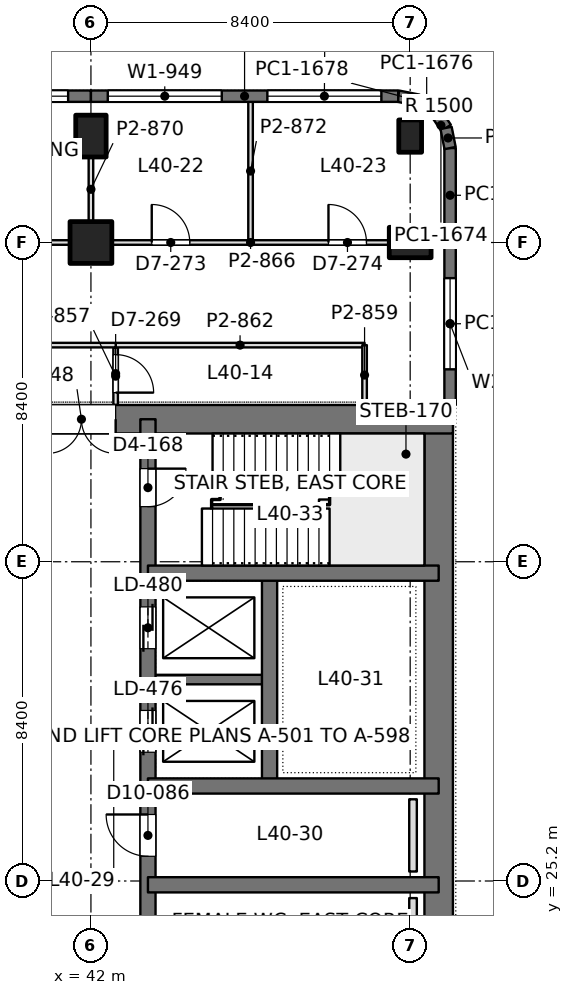
"""IFC4 building model, lengths in metres.
Left out: names, types, materials, properties, quantities, classifications, styles, units other than length and angle.
Written with IfcOpenShell. Run it as: python <this file> out.ifc"""

import sys

from ifc_helpers import new_model, si_unit, direction, frame, frame_2d, origin, origin_2d, place, context, subcontext, project, spatial, rectangle, extrude, element, fill, save


model = new_model("IFC4")
c1 = context("Model", 3, precision=1e-05, world=origin(), true_north=direction((0.0, 1.0)))
c2 = subcontext(c1, "Body", "Model", "MODEL_VIEW")
j1 = project(units=[si_unit("LENGTHUNIT", "METRE"), si_unit("PLANEANGLEUNIT", "RADIAN")], contexts=[c1])
p1 = place(None, origin())
s1 = spatial("IfcSite", under=j1, at=p1, CompositionType="ELEMENT")
p2 = place(p1, origin())
s2 = spatial("IfcBuilding", under=s1, at=p2, CompositionType="ELEMENT")
p3 = place(p2, frame((0.0, 0.0, 177.6)))
s3 = spatial("IfcBuildingStorey", under=s2, at=p3, CompositionType="ELEMENT", Elevation=177.6)
p4 = place(p3, frame((42.0, 42.0, 0.0), z_axis=(0.0, 0.0, 1.0), x_axis=(1.0, 0.0, 0.0)))
e1 = element("IfcColumn", 1, at=p4, inside=s3, PredefinedType="COLUMN", context=c2, shape_type="SweptSolid", body=[
    extrude(rectangle(XDim=1.1, YDim=1.1, at=origin_2d()), origin(), (0.0, 0.0, 1.0), 4.2),
])
for number, where, z_axis, x_axis in (
    (2, (42.0, 44.8, 0.0), (0.0, 0.0, 1.0), (1.0, 0.0, 0.0)),
    (3, (50.4, 42.0, 0.0), (0.0, 0.0, 1.0), (0.0, 1.0, 0.0)),
):
    element("IfcColumn", number, at=place(p3, frame(where, z_axis=z_axis, x_axis=x_axis)), inside=s3, PredefinedType="COLUMN", context=c2, shape_type="SweptSolid", body=[
        extrude(rectangle(XDim=0.8, YDim=1.1, at=origin_2d()), origin(), (0.0, 0.0, 1.0), 4.2),
    ])
p5 = place(p3, frame((50.4, 44.8, 0.0), z_axis=(0.0, 0.0, 1.0), x_axis=(1.0, 0.0, 0.0)))
e4 = element("IfcColumn", 4, at=p5, inside=s3, PredefinedType="COLUMN", context=c2, shape_type="SweptSolid", body=[
    extrude(rectangle(XDim=0.6, YDim=0.85, at=origin_2d()), origin(), (0.0, 0.0, 1.0), 4.2),
])
p6 = place(p3, frame((33.675, 37.35, 0.0), z_axis=(0.0, 0.0, 1.0), x_axis=(1.0, 0.0, 0.0)))
e5 = element("IfcWall", 5, at=p6, inside=s3, PredefinedType="SHEAR", context=c2, shape_type="SweptSolid", body=[
    extrude(rectangle(XDim=17.85, YDim=0.75, at=frame_2d((8.925, 0.0))), origin(), (0.0, 0.0, 1.0), 4.2),
])
p7 = place(p6, frame((7.175, 0.0, 0.0)))
e6 = element("IfcOpeningElement", 6, at=p7, cuts=e5, PredefinedType="OPENING", context=c2, shape_type="SweptSolid", body=[
    extrude(rectangle(XDim=1.8, YDim=2.4, at=frame_2d((0.9, 1.2))), frame((0.0, 0.385, 0.0), z_axis=(0.0, -1.0, 0.0), x_axis=(1.0, 0.0, 0.0)), (0.0, 0.0, 1.0), 0.77),
])
p8 = place(p3, frame((51.15, 13.05, 0.0), z_axis=(0.0, 0.0, 1.0), x_axis=(0.0, 1.0, 0.0)))
e7 = element("IfcWall", 7, at=p8, inside=s3, PredefinedType="SHEAR", context=c2, shape_type="SweptSolid", body=[
    extrude(rectangle(XDim=24.3, YDim=0.75, at=frame_2d((12.15, 0.0))), origin(), (0.0, 0.0, 1.0), 4.2),
])
p9 = place(p3, frame((43.5, 13.05, 0.0), z_axis=(0.0, 0.0, 1.0), x_axis=(0.0, 1.0, 0.0)))
e8 = element("IfcWall", 8, at=p9, inside=s3, PredefinedType="SHEAR", context=c2, shape_type="SweptSolid", body=[
    extrude(rectangle(XDim=24.3, YDim=0.4, at=frame_2d((12.15, 0.0))), origin(), (0.0, 0.0, 1.0), 4.2),
])
p10 = place(p9, frame((1.3, 0.0, 0.0)))
e9 = element("IfcOpeningElement", 9, at=p10, cuts=e8, PredefinedType="OPENING", context=c2, shape_type="SweptSolid", body=[
    extrude(rectangle(XDim=1.0, YDim=2.2, at=frame_2d((0.5, 1.1))), frame((0.0, 0.21, 0.0), z_axis=(0.0, -1.0, 0.0), x_axis=(1.0, 0.0, 0.0)), (0.0, 0.0, 1.0), 0.42),
])
p11 = place(p9, frame((22.0, 0.0, 0.0)))
e10 = element("IfcOpeningElement", 10, at=p11, cuts=e8, PredefinedType="OPENING", context=c2, shape_type="SweptSolid", body=[
    extrude(rectangle(XDim=1.0, YDim=2.2, at=frame_2d((0.5, 1.1))), frame((0.0, 0.21, 0.0), z_axis=(0.0, -1.0, 0.0), x_axis=(1.0, 0.0, 0.0)), (0.0, 0.0, 1.0), 0.42),
])
p12 = place(p9, frame((5.55, 0.0, 0.0)))
e11 = element("IfcOpeningElement", 11, at=p12, cuts=e8, PredefinedType="OPENING", context=c2, shape_type="SweptSolid", body=[
    extrude(rectangle(XDim=1.0, YDim=2.2, at=frame_2d((0.5, 1.1))), frame((0.0, 0.21, 0.0), z_axis=(0.0, -1.0, 0.0), x_axis=(1.0, 0.0, 0.0)), (0.0, 0.0, 1.0), 0.42),
])
p13 = place(p9, frame((9.55, 0.0, 0.0)))
e12 = element("IfcOpeningElement", 12, at=p13, cuts=e8, PredefinedType="OPENING", context=c2, shape_type="SweptSolid", body=[
    extrude(rectangle(XDim=1.0, YDim=2.2, at=frame_2d((0.5, 1.1))), frame((0.0, 0.21, 0.0), z_axis=(0.0, -1.0, 0.0), x_axis=(1.0, 0.0, 0.0)), (0.0, 0.0, 1.0), 0.42),
])
p14 = place(p9, frame((12.8, 0.0, 0.0)))
e13 = element("IfcOpeningElement", 13, at=p14, cuts=e8, PredefinedType="OPENING", context=c2, shape_type="SweptSolid", body=[
    extrude(rectangle(XDim=1.1, YDim=2.2, at=frame_2d((0.55, 1.1))), frame((0.0, 0.21, 0.0), z_axis=(0.0, -1.0, 0.0), x_axis=(1.0, 0.0, 0.0)), (0.0, 0.0, 1.0), 0.42),
])
p15 = place(p9, frame((15.538, 0.0, 0.0)))
e14 = element("IfcOpeningElement", 14, at=p15, cuts=e8, PredefinedType="OPENING", context=c2, shape_type="SweptSolid", body=[
    extrude(rectangle(XDim=1.1, YDim=2.2, at=frame_2d((0.55, 1.1))), frame((0.0, 0.21, 0.0), z_axis=(0.0, -1.0, 0.0), x_axis=(1.0, 0.0, 0.0)), (0.0, 0.0, 1.0), 0.42),
])
p16 = place(p9, frame((18.262, 0.0, 0.0)))
e15 = element("IfcOpeningElement", 15, at=p16, cuts=e8, PredefinedType="OPENING", context=c2, shape_type="SweptSolid", body=[
    extrude(rectangle(XDim=1.1, YDim=2.2, at=frame_2d((0.55, 1.1))), frame((0.0, 0.21, 0.0), z_axis=(0.0, -1.0, 0.0), x_axis=(1.0, 0.0, 0.0)), (0.0, 0.0, 1.0), 0.42),
])
for number, where, z_axis, x_axis in (
    (16, (51.15, 25.1, 0.0), (0.0, 0.0, 1.0), (-1.0, 0.0, 0.0)),
    (17, (51.15, 27.7, 0.0), (0.0, 0.0, 1.0), (-1.0, 0.0, 0.0)),
    (18, (51.15, 33.3, 0.0), (0.0, 0.0, 1.0), (-1.0, 0.0, 0.0)),
):
    element("IfcWall", number, at=place(p3, frame(where, z_axis=z_axis, x_axis=x_axis)), inside=s3, PredefinedType="SHEAR", context=c2, shape_type="SweptSolid", body=[
        extrude(rectangle(XDim=7.65, YDim=0.4, at=frame_2d((3.825, 0.0))), origin(), (0.0, 0.0, 1.0), 4.2),
    ])
p17 = place(p3, frame((46.7, 27.7, 0.0), z_axis=(0.0, 0.0, 1.0), x_axis=(0.0, 1.0, 0.0)))
e19 = element("IfcWall", 19, at=p17, inside=s3, PredefinedType="SHEAR", context=c2, shape_type="SweptSolid", body=[
    extrude(rectangle(XDim=5.6, YDim=0.4, at=frame_2d((2.8, 0.0))), origin(), (0.0, 0.0, 1.0), 4.2),
])
p18 = place(p3, frame((46.7, 30.5, 0.0), z_axis=(0.0, 0.0, 1.0), x_axis=(-1.0, 0.0, 0.0)))
e20 = element("IfcWall", 20, at=p18, inside=s3, PredefinedType="SHEAR", context=c2, shape_type="SweptSolid", body=[
    extrude(rectangle(XDim=3.2, YDim=0.25, at=frame_2d((1.6, 0.0))), origin(), (0.0, 0.0, 1.0), 4.2),
])
p19 = place(p3, frame((33.6, 45.85, 0.0), z_axis=(0.0, 0.0, 1.0), x_axis=(1.0, 0.0, 0.0)))
e21 = element("IfcWall", 21, at=p19, inside=s3, PredefinedType="SOLIDWALL", context=c2, shape_type="SweptSolid", body=[
    extrude(rectangle(XDim=8.4, YDim=0.3, at=frame_2d((4.2, 0.0))), origin(), (0.0, 0.0, 1.0), 4.05),
])
p20 = place(p19, frame((0.6, 0.0, 0.9)))
e22 = element("IfcOpeningElement", 22, at=p20, cuts=e21, PredefinedType="OPENING", context=c2, shape_type="SweptSolid", body=[
    extrude(rectangle(XDim=3.0, YDim=1.9, at=frame_2d((1.5, 0.95))), frame((0.0, 0.16, 0.0), z_axis=(0.0, -1.0, 0.0), x_axis=(1.0, 0.0, 0.0)), (0.0, 0.0, 1.0), 0.32),
])
p21 = place(p19, frame((4.8, 0.0, 0.9)))
e23 = element("IfcOpeningElement", 23, at=p21, cuts=e21, PredefinedType="OPENING", context=c2, shape_type="SweptSolid", body=[
    extrude(rectangle(XDim=3.0, YDim=1.9, at=frame_2d((1.5, 0.95))), frame((0.0, 0.16, 0.0), z_axis=(0.0, -1.0, 0.0), x_axis=(1.0, 0.0, 0.0)), (0.0, 0.0, 1.0), 0.32),
])
p22 = place(p3, frame((42.0, 45.85, 0.0), z_axis=(0.0, 0.0, 1.0), x_axis=(1.0, 0.0, 0.0)))
e24 = element("IfcWall", 24, at=p22, inside=s3, PredefinedType="SOLIDWALL", context=c2, shape_type="SweptSolid", body=[
    extrude(rectangle(XDim=8.085, YDim=0.3, at=frame_2d((4.042, 0.0))), origin(), (0.0, 0.0, 1.0), 4.05),
])
p23 = place(p22, frame((0.443, 0.0, 0.9)))
e25 = element("IfcOpeningElement", 25, at=p23, cuts=e24, PredefinedType="OPENING", context=c2, shape_type="SweptSolid", body=[
    extrude(rectangle(XDim=3.0, YDim=1.9, at=frame_2d((1.5, 0.95))), frame((0.0, 0.16, 0.0), z_axis=(0.0, -1.0, 0.0), x_axis=(1.0, 0.0, 0.0)), (0.0, 0.0, 1.0), 0.32),
])
p24 = place(p22, frame((4.643, 0.0, 0.9)))
e26 = element("IfcOpeningElement", 26, at=p24, cuts=e24, PredefinedType="OPENING", context=c2, shape_type="SweptSolid", body=[
    extrude(rectangle(XDim=3.0, YDim=1.9, at=frame_2d((1.5, 0.95))), frame((0.0, 0.16, 0.0), z_axis=(0.0, -1.0, 0.0), x_axis=(1.0, 0.0, 0.0)), (0.0, 0.0, 1.0), 0.32),
])
p25 = place(p3, frame((50.085, 45.85, 0.0), z_axis=(0.0, 0.0, 1.0), x_axis=(0.980702050465, -0.1955082817, 0.0)))
e27 = element("IfcWall", 27, at=p25, inside=s3, PredefinedType="SOLIDWALL", context=c2, shape_type="SweptSolid", body=[
    extrude(rectangle(XDim=0.541, YDim=0.3, at=frame_2d((0.271, 0.0))), origin(), (0.0, 0.0, 1.0), 4.05),
])
p26 = place(p3, frame((50.615, 45.744, 0.0), z_axis=(0.0, 0.0, 1.0), x_axis=(0.831692711774, -0.555236195849, 0.0)))
e28 = element("IfcWall", 28, at=p26, inside=s3, PredefinedType="SOLIDWALL", context=c2, shape_type="SweptSolid", body=[
    extrude(rectangle(XDim=0.525, YDim=0.3, at=frame_2d((0.263, 0.0))), origin(), (0.0, 0.0, 1.0), 4.05),
])
p27 = place(p3, frame((51.052, 45.453, 0.0), z_axis=(0.0, 0.0, 1.0), x_axis=(0.55534295404, -0.831621430339, 0.0)))
e29 = element("IfcWall", 29, at=p27, inside=s3, PredefinedType="SOLIDWALL", context=c2, shape_type="SweptSolid", body=[
    extrude(rectangle(XDim=0.526, YDim=0.3, at=frame_2d((0.263, 0.0))), origin(), (0.0, 0.0, 1.0), 4.05),
])
p28 = place(p3, frame((51.344, 45.015, 0.0), z_axis=(0.0, 0.0, 1.0), x_axis=(0.195073962632, -0.980788534345, 0.0)))
e30 = element("IfcWall", 30, at=p28, inside=s3, PredefinedType="SOLIDWALL", context=c2, shape_type="SweptSolid", body=[
    extrude(rectangle(XDim=0.541, YDim=0.3, at=frame_2d((0.271, 0.0))), origin(), (0.0, 0.0, 1.0), 4.05),
])
p29 = place(p3, frame((51.45, 44.485, 0.0), z_axis=(0.0, 0.0, 1.0), x_axis=(0.0, -1.0, 0.0)))
e31 = element("IfcWall", 31, at=p29, inside=s3, PredefinedType="SOLIDWALL", context=c2, shape_type="SweptSolid", body=[
    extrude(rectangle(XDim=2.485, YDim=0.3, at=frame_2d((1.243, 0.0))), origin(), (0.0, 0.0, 1.0), 4.05),
])
p30 = place(p3, frame((51.45, 42.0, 0.0), z_axis=(0.0, 0.0, 1.0), x_axis=(0.0, -1.0, 0.0)))
e32 = element("IfcWall", 32, at=p30, inside=s3, PredefinedType="SOLIDWALL", context=c2, shape_type="SweptSolid", body=[
    extrude(rectangle(XDim=4.275, YDim=0.3, at=frame_2d((2.137, 0.0))), origin(), (0.0, 0.0, 1.0), 4.05),
])
p31 = place(p30, frame((0.938, 0.0, 0.9)))
e33 = element("IfcOpeningElement", 33, at=p31, cuts=e32, PredefinedType="OPENING", context=c2, shape_type="SweptSolid", body=[
    extrude(rectangle(XDim=2.4, YDim=1.9, at=frame_2d((1.2, 0.95))), frame((0.0, 0.16, 0.0), z_axis=(0.0, -1.0, 0.0), x_axis=(1.0, 0.0, 0.0)), (0.0, 0.0, 1.0), 0.32),
])
p32 = place(p3, frame((34.149, 42.0, 0.0), z_axis=(0.0, 0.0, 1.0), x_axis=(1.0, 0.0, 0.0)))
e34 = element("IfcWall", 34, at=p32, inside=s3, PredefinedType="PARTITIONING", context=c2, shape_type="SweptSolid", body=[
    extrude(rectangle(XDim=7.302, YDim=0.12, at=frame_2d((3.651, 0.0))), origin(), (0.0, 0.0, 1.0), 3.55),
])
p33 = place(p32, frame((2.751, 0.0, 0.0)))
e35 = element("IfcOpeningElement", 35, at=p33, cuts=e34, PredefinedType="OPENING", context=c2, shape_type="SweptSolid", body=[
    extrude(rectangle(XDim=1.8, YDim=2.2, at=frame_2d((0.9, 1.1))), frame((0.0, 0.07, 0.0), z_axis=(0.0, -1.0, 0.0), x_axis=(1.0, 0.0, 0.0)), (0.0, 0.0, 1.0), 0.14),
])
p34 = place(p3, frame((42.549, 42.0, 0.0), z_axis=(0.0, 0.0, 1.0), x_axis=(1.0, 0.0, 0.0)))
e36 = element("IfcWall", 36, at=p34, inside=s3, PredefinedType="PARTITIONING", context=c2, shape_type="SweptSolid", body=[
    extrude(rectangle(XDim=7.302, YDim=0.12, at=frame_2d((3.651, 0.0))), origin(), (0.0, 0.0, 1.0), 3.55),
])
p35 = place(p34, frame((1.051, 0.0, 0.0)))
e37 = element("IfcOpeningElement", 37, at=p35, cuts=e36, PredefinedType="OPENING", context=c2, shape_type="SweptSolid", body=[
    extrude(rectangle(XDim=1.0, YDim=2.4, at=frame_2d((0.5, 1.2))), frame((0.0, 0.07, 0.0), z_axis=(0.0, -1.0, 0.0), x_axis=(1.0, 0.0, 0.0)), (0.0, 0.0, 1.0), 0.14),
])
p36 = place(p34, frame((5.701, 0.0, 0.0)))
e38 = element("IfcOpeningElement", 38, at=p36, cuts=e36, PredefinedType="OPENING", context=c2, shape_type="SweptSolid", body=[
    extrude(rectangle(XDim=1.0, YDim=2.4, at=frame_2d((0.5, 1.2))), frame((0.0, 0.07, 0.0), z_axis=(0.0, -1.0, 0.0), x_axis=(1.0, 0.0, 0.0)), (0.0, 0.0, 1.0), 0.14),
])
p37 = place(p3, frame((42.0, 42.549, 0.0), z_axis=(0.0, 0.0, 1.0), x_axis=(0.0, 1.0, 0.0)))
e39 = element("IfcWall", 39, at=p37, inside=s3, PredefinedType="PARTITIONING", context=c2, shape_type="SweptSolid", body=[
    extrude(rectangle(XDim=1.702, YDim=0.12, at=frame_2d((0.851, 0.0))), origin(), (0.0, 0.0, 1.0), 3.69),
])
p38 = place(p3, frame((46.2, 42.058, 0.0), z_axis=(0.0, 0.0, 1.0), x_axis=(0.0, 1.0, 0.0)))
e40 = element("IfcWall", 40, at=p38, inside=s3, PredefinedType="PARTITIONING", context=c2, shape_type="SweptSolid", body=[
    extrude(rectangle(XDim=3.644, YDim=0.12, at=frame_2d((1.822, 0.0))), origin(), (0.0, 0.0, 1.0), 3.55),
])
p39 = place(p3, frame((7.748, 39.3, 0.0), z_axis=(0.0, 0.0, 1.0), x_axis=(1.0, 0.0, 0.0)))
e41 = element("IfcWall", 41, at=p39, inside=s3, PredefinedType="PARTITIONING", context=c2, shape_type="SweptSolid", body=[
    extrude(rectangle(XDim=34.904, YDim=0.12, at=frame_2d((17.452, 0.0))), origin(), (0.0, 0.0, 1.0), 3.55),
])
p40 = place(p39, frame((10.735, 0.0, 0.0)))
e42 = element("IfcOpeningElement", 42, at=p40, cuts=e41, PredefinedType="OPENING", context=c2, shape_type="SweptSolid", body=[
    extrude(rectangle(XDim=1.8, YDim=2.2, at=frame_2d((0.9, 1.1))), frame((0.0, 0.07, 0.0), z_axis=(0.0, -1.0, 0.0), x_axis=(1.0, 0.0, 0.0)), (0.0, 0.0, 1.0), 0.14),
])
p41 = place(p39, frame((22.369, 0.0, 0.0)))
e43 = element("IfcOpeningElement", 43, at=p41, cuts=e41, PredefinedType="OPENING", context=c2, shape_type="SweptSolid", body=[
    extrude(rectangle(XDim=1.8, YDim=2.2, at=frame_2d((0.9, 1.1))), frame((0.0, 0.07, 0.0), z_axis=(0.0, -1.0, 0.0), x_axis=(1.0, 0.0, 0.0)), (0.0, 0.0, 1.0), 0.14),
])
p42 = place(p3, frame((42.65, 37.724, 0.0), z_axis=(0.0, 0.0, 1.0), x_axis=(0.0, 1.0, 0.0)))
e44 = element("IfcWall", 44, at=p42, inside=s3, PredefinedType="PARTITIONING", context=c2, shape_type="SweptSolid", body=[
    extrude(rectangle(XDim=1.518, YDim=0.12, at=frame_2d((0.759, 0.0))), origin(), (0.0, 0.0, 1.0), 4.05),
])
p43 = place(p42, frame((0.326, 0.0, 0.0)))
e45 = element("IfcOpeningElement", 45, at=p43, cuts=e44, PredefinedType="OPENING", context=c2, shape_type="SweptSolid", body=[
    extrude(rectangle(XDim=1.0, YDim=2.4, at=frame_2d((0.5, 1.2))), frame((0.0, 0.07, 0.0), z_axis=(0.0, -1.0, 0.0), x_axis=(1.0, 0.0, 0.0)), (0.0, 0.0, 1.0), 0.14),
])
p44 = place(p3, frame((42.648, 39.3, 0.0), z_axis=(0.0, 0.0, 1.0), x_axis=(1.0, 0.0, 0.0)))
e46 = element("IfcWall", 46, at=p44, inside=s3, PredefinedType="PARTITIONING", context=c2, shape_type="SweptSolid", body=[
    extrude(rectangle(XDim=6.552, YDim=0.12, at=frame_2d((3.276, 0.0))), origin(), (0.0, 0.0, 1.0), 3.69),
])
p45 = place(p3, frame((49.2, 37.724, 0.0), z_axis=(0.0, 0.0, 1.0), x_axis=(0.0, 1.0, 0.0)))
e47 = element("IfcWall", 47, at=p45, inside=s3, PredefinedType="PARTITIONING", context=c2, shape_type="SweptSolid", body=[
    extrude(rectangle(XDim=1.576, YDim=0.12, at=frame_2d((0.788, 0.0))), origin(), (0.0, 0.0, 1.0), 4.05),
])
p46 = place(p3, frame((50.475, 21.45, 0.0), z_axis=(0.0, 0.0, 1.0), x_axis=(0.0, 1.0, 0.0)))
e48 = element("IfcWall", 48, at=p46, inside=s3, PredefinedType="PLUMBINGWALL", context=c2, shape_type="SweptSolid", body=[
    extrude(rectangle(XDim=3.3, YDim=0.2, at=frame_2d((1.65, 0.0))), origin(), (0.0, 0.0, 1.0), 1.2),
])
p47 = place(p3, frame((50.475, 25.45, 0.0), z_axis=(0.0, 0.0, 1.0), x_axis=(0.0, 1.0, 0.0)))
e49 = element("IfcWall", 49, at=p47, inside=s3, PredefinedType="PLUMBINGWALL", context=c2, shape_type="SweptSolid", body=[
    extrude(rectangle(XDim=1.9, YDim=0.2, at=frame_2d((0.95, 0.0))), origin(), (0.0, 0.0, 1.0), 1.2),
])
p48 = place(p21, origin())
e50 = element("IfcWindow", 50, at=p48, inside=s3, PartitioningType="SINGLE_PANEL", PredefinedType="WINDOW", context=c2, shape_type="SweptSolid", body=[
    extrude(rectangle(XDim=3.0, YDim=1.9, at=frame_2d((1.5, 0.95))), frame((0.0, 0.03, 0.0), z_axis=(0.0, -1.0, 0.0), x_axis=(1.0, 0.0, 0.0)), (0.0, 0.0, 1.0), 0.06),
])
fill(e23, e50)
p49 = place(p23, origin())
e51 = element("IfcWindow", 51, at=p49, inside=s3, PartitioningType="SINGLE_PANEL", PredefinedType="WINDOW", context=c2, shape_type="SweptSolid", body=[
    extrude(rectangle(XDim=3.0, YDim=1.9, at=frame_2d((1.5, 0.95))), frame((0.0, 0.03, 0.0), z_axis=(0.0, -1.0, 0.0), x_axis=(1.0, 0.0, 0.0)), (0.0, 0.0, 1.0), 0.06),
])
fill(e25, e51)
p50 = place(p24, origin())
e52 = element("IfcWindow", 52, at=p50, inside=s3, PartitioningType="SINGLE_PANEL", PredefinedType="WINDOW", context=c2, shape_type="SweptSolid", body=[
    extrude(rectangle(XDim=3.0, YDim=1.9, at=frame_2d((1.5, 0.95))), frame((0.0, 0.03, 0.0), z_axis=(0.0, -1.0, 0.0), x_axis=(1.0, 0.0, 0.0)), (0.0, 0.0, 1.0), 0.06),
])
fill(e26, e52)
p51 = place(p31, origin())
e53 = element("IfcWindow", 53, at=p51, inside=s3, PartitioningType="SINGLE_PANEL", PredefinedType="WINDOW", context=c2, shape_type="SweptSolid", body=[
    extrude(rectangle(XDim=2.4, YDim=1.9, at=frame_2d((1.2, 0.95))), frame((0.0, 0.03, 0.0), z_axis=(0.0, -1.0, 0.0), x_axis=(1.0, 0.0, 0.0)), (0.0, 0.0, 1.0), 0.06),
])
fill(e33, e53)
p52 = place(p7, frame((1.8, 0.0, 0.0), z_axis=(0.0, 0.0, 1.0), x_axis=(-1.0, 0.0, 0.0)))
e54 = element("IfcDoor", 54, at=p52, inside=s3, OperationType="DOUBLE_DOOR_SINGLE_SWING", PredefinedType="DOOR", context=c2, shape_type="SweptSolid", body=[
    extrude(rectangle(XDim=1.8, YDim=2.4, at=frame_2d((0.9, 1.2))), frame((0.0, 0.025, 0.0), z_axis=(0.0, -1.0, 0.0), x_axis=(1.0, 0.0, 0.0)), (0.0, 0.0, 1.0), 0.05),
])
fill(e6, e54)
p53 = place(p11, frame((1.0, 0.0, 0.0), z_axis=(0.0, 0.0, 1.0), x_axis=(-1.0, 0.0, 0.0)))
e55 = element("IfcDoor", 55, at=p53, inside=s3, OperationType="SINGLE_SWING_LEFT", PredefinedType="DOOR", context=c2, shape_type="SweptSolid", body=[
    extrude(rectangle(XDim=1.0, YDim=2.2, at=frame_2d((0.5, 1.1))), frame((0.0, 0.025, 0.0), z_axis=(0.0, -1.0, 0.0), x_axis=(1.0, 0.0, 0.0)), (0.0, 0.0, 1.0), 0.05),
])
fill(e10, e55)
p54 = place(p14, origin())
e56 = element("IfcDoor", 56, at=p54, inside=s3, OperationType="SINGLE_SWING_RIGHT", PredefinedType="DOOR", context=c2, shape_type="SweptSolid", body=[
    extrude(rectangle(XDim=1.1, YDim=2.2, at=frame_2d((0.55, 1.1))), frame((0.0, 0.025, 0.0), z_axis=(0.0, -1.0, 0.0), x_axis=(1.0, 0.0, 0.0)), (0.0, 0.0, 1.0), 0.05),
])
fill(e13, e56)
p55 = place(p15, origin())
e57 = element("IfcDoor", 57, at=p55, inside=s3, OperationType="DOUBLE_DOOR_SLIDING", PredefinedType="DOOR", context=c2, shape_type="SweptSolid", body=[
    extrude(rectangle(XDim=1.1, YDim=2.2, at=frame_2d((0.55, 1.1))), frame((0.0, 0.025, 0.0), z_axis=(0.0, -1.0, 0.0), x_axis=(1.0, 0.0, 0.0)), (0.0, 0.0, 1.0), 0.05),
])
fill(e14, e57)
p56 = place(p16, origin())
e58 = element("IfcDoor", 58, at=p56, inside=s3, OperationType="DOUBLE_DOOR_SLIDING", PredefinedType="DOOR", context=c2, shape_type="SweptSolid", body=[
    extrude(rectangle(XDim=1.1, YDim=2.2, at=frame_2d((0.55, 1.1))), frame((0.0, 0.025, 0.0), z_axis=(0.0, -1.0, 0.0), x_axis=(1.0, 0.0, 0.0)), (0.0, 0.0, 1.0), 0.05),
])
fill(e15, e58)
p57 = place(p35, origin())
e59 = element("IfcDoor", 59, at=p57, inside=s3, OperationType="SINGLE_SWING_LEFT", PredefinedType="DOOR", context=c2, shape_type="SweptSolid", body=[
    extrude(rectangle(XDim=1.0, YDim=2.4, at=frame_2d((0.5, 1.2))), frame((0.0, 0.025, 0.0), z_axis=(0.0, -1.0, 0.0), x_axis=(1.0, 0.0, 0.0)), (0.0, 0.0, 1.0), 0.05),
])
fill(e37, e59)
p58 = place(p36, origin())
e60 = element("IfcDoor", 60, at=p58, inside=s3, OperationType="SINGLE_SWING_LEFT", PredefinedType="DOOR", context=c2, shape_type="SweptSolid", body=[
    extrude(rectangle(XDim=1.0, YDim=2.4, at=frame_2d((0.5, 1.2))), frame((0.0, 0.025, 0.0), z_axis=(0.0, -1.0, 0.0), x_axis=(1.0, 0.0, 0.0)), (0.0, 0.0, 1.0), 0.05),
])
fill(e38, e60)
p59 = place(p43, frame((1.0, 0.0, 0.0), z_axis=(0.0, 0.0, 1.0), x_axis=(-1.0, 0.0, 0.0)))
e61 = element("IfcDoor", 61, at=p59, inside=s3, OperationType="SINGLE_SWING_RIGHT", PredefinedType="DOOR", context=c2, shape_type="SweptSolid", body=[
    extrude(rectangle(XDim=1.0, YDim=2.4, at=frame_2d((0.5, 1.2))), frame((0.0, 0.025, 0.0), z_axis=(0.0, -1.0, 0.0), x_axis=(1.0, 0.0, 0.0)), (0.0, 0.0, 1.0), 0.05),
])
fill(e45, e61)
save(model, sys.argv[1])
